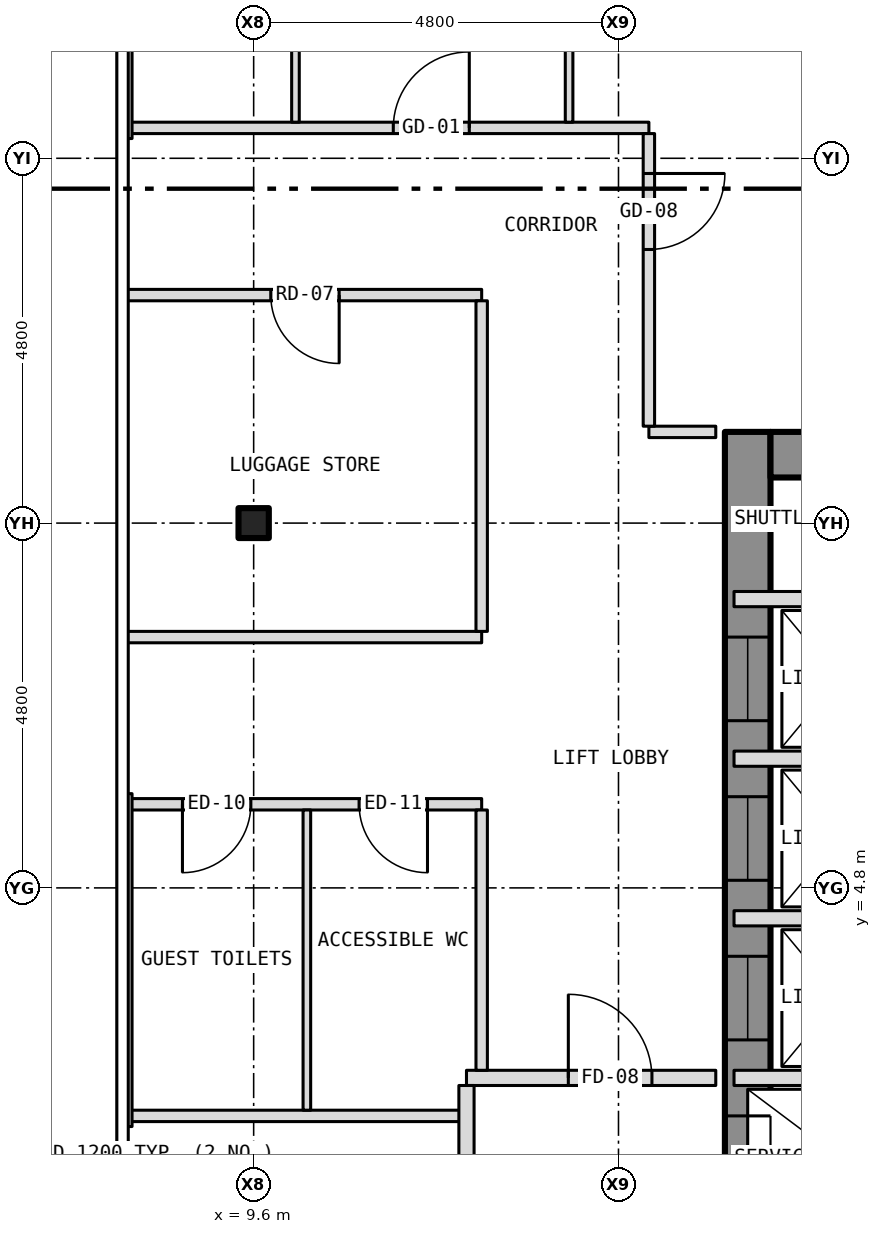
"""IFC4 building model, lengths in metres.
Left out: names, types, materials, properties, quantities, classifications, styles, units other than length and angle.
Written with IfcOpenShell. Run it as: python <this file> out.ifc"""

import sys

from ifc_helpers import new_model, si_unit, direction, frame, frame_2d, origin, origin_2d, place, context, subcontext, project, spatial, rectangle, i_section, extrude, element, fill, save


model = new_model("IFC4")
c1 = context("Model", 3, precision=1e-05, world=origin(), true_north=direction((0.0, 1.0)))
c2 = subcontext(c1, "Body", "Model", "MODEL_VIEW")
j1 = project(units=[si_unit("LENGTHUNIT", "METRE"), si_unit("PLANEANGLEUNIT", "RADIAN")], contexts=[c1])
p1 = place(None, origin())
s1 = spatial("IfcSite", under=j1, at=p1, CompositionType="ELEMENT")
p2 = place(p1, origin())
s2 = spatial("IfcBuilding", under=s1, at=p2, CompositionType="ELEMENT")
p3 = place(p2, frame((0.0, 0.0, 127.5)))
s3 = spatial("IfcBuildingStorey", under=s2, at=p3, CompositionType="ELEMENT", Elevation=127.5)
p4 = place(p3, frame((9.6, 9.6, -0.15), z_axis=(0.0, 0.0, 1.0), x_axis=(1.0, 0.0, 0.0)))
e1 = element("IfcColumn", 1, at=p4, inside=s3, PredefinedType="COLUMN", context=c2, shape_type="SweptSolid", body=[
    extrude(i_section(OverallWidth=0.399, OverallDepth=0.394, WebThickness=0.023, FlangeThickness=0.037, at=origin_2d()), origin(), (0.0, 0.0, 1.0), 3.5),
])
p5 = place(p3, frame((16.1, -10.8, 0.0), z_axis=(0.0, 0.0, 1.0), x_axis=(0.0, 1.0, 0.0)))
e2 = element("IfcWall", 2, at=p5, inside=s3, PredefinedType="SHEAR", context=c2, shape_type="SweptSolid", body=[
    extrude(rectangle(XDim=21.6, YDim=0.6, at=frame_2d((10.8, 0.0))), origin(), (0.0, 0.0, 1.0), 3.25),
])
p6 = place(p5, frame((9.4, 0.0, 0.0)))
e3 = element("IfcOpeningElement", 3, at=p6, cuts=e2, PredefinedType="OPENING", context=c2, shape_type="SweptSolid", body=[
    extrude(rectangle(XDim=1.1, YDim=2.1, at=frame_2d((0.55, 1.05))), frame((0.0, 0.312, 0.0), z_axis=(0.0, -1.0, 0.0), x_axis=(1.0, 0.0, 0.0)), (0.0, 0.0, 1.0), 0.624),
])
p7 = place(p5, frame((11.5, 0.0, 0.0)))
e4 = element("IfcOpeningElement", 4, at=p7, cuts=e2, PredefinedType="OPENING", context=c2, shape_type="SweptSolid", body=[
    extrude(rectangle(XDim=1.1, YDim=2.1, at=frame_2d((0.55, 1.05))), frame((0.0, 0.312, 0.0), z_axis=(0.0, -1.0, 0.0), x_axis=(1.0, 0.0, 0.0)), (0.0, 0.0, 1.0), 0.624),
])
p8 = place(p5, frame((13.6, 0.0, 0.0)))
e5 = element("IfcOpeningElement", 5, at=p8, cuts=e2, PredefinedType="OPENING", context=c2, shape_type="SweptSolid", body=[
    extrude(rectangle(XDim=1.1, YDim=2.1, at=frame_2d((0.55, 1.05))), frame((0.0, 0.312, 0.0), z_axis=(0.0, -1.0, 0.0), x_axis=(1.0, 0.0, 0.0)), (0.0, 0.0, 1.0), 0.624),
])
p9 = place(p5, frame((15.7, 0.0, 0.0)))
e6 = element("IfcOpeningElement", 6, at=p9, cuts=e2, PredefinedType="OPENING", context=c2, shape_type="SweptSolid", body=[
    extrude(rectangle(XDim=1.1, YDim=2.1, at=frame_2d((0.55, 1.05))), frame((0.0, 0.312, 0.0), z_axis=(0.0, -1.0, 0.0), x_axis=(1.0, 0.0, 0.0)), (0.0, 0.0, 1.0), 0.624),
])
p10 = place(p5, frame((17.8, 0.0, 0.0)))
e7 = element("IfcOpeningElement", 7, at=p10, cuts=e2, PredefinedType="OPENING", context=c2, shape_type="SweptSolid", body=[
    extrude(rectangle(XDim=1.1, YDim=2.1, at=frame_2d((0.55, 1.05))), frame((0.0, 0.312, 0.0), z_axis=(0.0, -1.0, 0.0), x_axis=(1.0, 0.0, 0.0)), (0.0, 0.0, 1.0), 0.624),
])
p11 = place(p5, frame((5.642, 0.0, 0.0)))
e8 = element("IfcOpeningElement", 8, at=p11, cuts=e2, PredefinedType="OPENING", context=c2, shape_type="SweptSolid", body=[
    extrude(rectangle(XDim=1.1, YDim=2.1, at=frame_2d((0.55, 1.05))), frame((0.0, 0.312, 0.0), z_axis=(0.0, -1.0, 0.0), x_axis=(1.0, 0.0, 0.0)), (0.0, 0.0, 1.0), 0.624),
])
p12 = place(p5, frame((7.5, 0.0, 0.0)))
e9 = element("IfcOpeningElement", 9, at=p12, cuts=e2, PredefinedType="OPENING", context=c2, shape_type="SweptSolid", body=[
    extrude(rectangle(XDim=1.1, YDim=2.1, at=frame_2d((0.55, 1.05))), frame((0.0, 0.312, 0.0), z_axis=(0.0, -1.0, 0.0), x_axis=(1.0, 0.0, 0.0)), (0.0, 0.0, 1.0), 0.624),
])
p13 = place(p3, frame((16.4, 10.5, 0.0), z_axis=(0.0, 0.0, 1.0), x_axis=(1.0, 0.0, 0.0)))
e10 = element("IfcWall", 10, at=p13, inside=s3, PredefinedType="SHEAR", context=c2, shape_type="SweptSolid", body=[
    extrude(rectangle(XDim=5.8, YDim=0.6, at=frame_2d((2.9, 0.0))), origin(), (0.0, 0.0, 1.0), 3.25),
])
p14 = place(p3, frame((7.875, -1.4, 0.0), z_axis=(0.0, 0.0, 1.0), x_axis=(0.0, 1.0, 0.0)))
e11 = element("IfcWall", 11, at=p14, inside=s3, PredefinedType="SOLIDWALL", context=c2, shape_type="SweptSolid", body=[
    extrude(rectangle(XDim=2.8, YDim=0.2, at=frame_2d((1.4, 0.0))), origin(), (0.0, 0.0, 1.0), 3.5),
])
p15 = place(p14, frame((0.5, 0.0, 0.0)))
e12 = element("IfcOpeningElement", 12, at=p15, cuts=e11, PredefinedType="OPENING", context=c2, shape_type="SweptSolid", body=[
    extrude(rectangle(XDim=1.8, YDim=2.1, at=frame_2d((0.9, 1.05))), frame((0.0, 0.112, 0.0), z_axis=(0.0, -1.0, 0.0), x_axis=(1.0, 0.0, 0.0)), (0.0, 0.0, 1.0), 0.224),
])
p16 = place(p3, frame((7.95, 1.8, 0.0), z_axis=(0.0, 0.0, 1.0), x_axis=(1.0, 0.0, 0.0)))
e13 = element("IfcWall", 13, at=p16, inside=s3, PredefinedType="PARTITIONING", context=c2, shape_type="SweptSolid", body=[
    extrude(rectangle(XDim=4.45, YDim=0.15, at=frame_2d((2.225, 0.0))), origin(), (0.0, 0.0, 1.0), 3.35),
])
p17 = place(p3, frame((12.4, 2.3, 0.0), z_axis=(0.0, 0.0, 1.0), x_axis=(1.0, 0.0, 0.0)))
e14 = element("IfcWall", 14, at=p17, inside=s3, PredefinedType="PARTITIONING", context=c2, shape_type="SweptSolid", body=[
    extrude(rectangle(XDim=3.28, YDim=0.2, at=frame_2d((1.64, 0.0))), origin(), (0.0, 0.0, 1.0), 3.35),
])
p18 = place(p17, frame((1.34, 0.0, 0.0)))
e15 = element("IfcOpeningElement", 15, at=p18, cuts=e14, PredefinedType="OPENING", context=c2, shape_type="SweptSolid", body=[
    extrude(rectangle(XDim=1.1, YDim=2.1, at=frame_2d((0.55, 1.05))), frame((0.0, 0.112, 0.0), z_axis=(0.0, -1.0, 0.0), x_axis=(1.0, 0.0, 0.0)), (0.0, 0.0, 1.0), 0.224),
])
for number, where, z_axis, x_axis in (
    (16, (15.92, 2.3, 0.0), (0.0, 0.0, 1.0), (1.0, 0.0, 0.0)),
    (17, (15.92, 4.4, 0.0), (0.0, 0.0, 1.0), (1.0, 0.0, 0.0)),
):
    element("IfcWall", number, at=place(p3, frame(where, z_axis=z_axis, x_axis=x_axis)), inside=s3, PredefinedType="PARTITIONING", context=c2, shape_type="SweptSolid", body=[
        extrude(rectangle(XDim=2.88, YDim=0.2, at=frame_2d((1.44, 0.0))), origin(), (0.0, 0.0, 1.0), 3.25),
    ])
p19 = place(p3, frame((7.95, 5.9, 0.0), z_axis=(0.0, 0.0, 1.0), x_axis=(1.0, 0.0, 0.0)))
e18 = element("IfcWall", 18, at=p19, inside=s3, PredefinedType="PARTITIONING", context=c2, shape_type="SweptSolid", body=[
    extrude(rectangle(XDim=4.65, YDim=0.15, at=frame_2d((2.325, 0.0))), origin(), (0.0, 0.0, 1.0), 3.35),
])
p20 = place(p19, frame((0.713, 0.0, 0.0)))
e19 = element("IfcOpeningElement", 19, at=p20, cuts=e18, PredefinedType="OPENING", context=c2, shape_type="SweptSolid", body=[
    extrude(rectangle(XDim=0.9, YDim=2.1, at=frame_2d((0.45, 1.05))), frame((0.0, 0.087, 0.0), z_axis=(0.0, -1.0, 0.0), x_axis=(1.0, 0.0, 0.0)), (0.0, 0.0, 1.0), 0.174),
])
p21 = place(p19, frame((3.037, 0.0, 0.0)))
e20 = element("IfcOpeningElement", 20, at=p21, cuts=e18, PredefinedType="OPENING", context=c2, shape_type="SweptSolid", body=[
    extrude(rectangle(XDim=0.9, YDim=2.1, at=frame_2d((0.45, 1.05))), frame((0.0, 0.087, 0.0), z_axis=(0.0, -1.0, 0.0), x_axis=(1.0, 0.0, 0.0)), (0.0, 0.0, 1.0), 0.174),
])
p22 = place(p3, frame((15.92, 6.5, 0.0), z_axis=(0.0, 0.0, 1.0), x_axis=(1.0, 0.0, 0.0)))
e21 = element("IfcWall", 21, at=p22, inside=s3, PredefinedType="PARTITIONING", context=c2, shape_type="SweptSolid", body=[
    extrude(rectangle(XDim=2.88, YDim=0.2, at=frame_2d((1.44, 0.0))), origin(), (0.0, 0.0, 1.0), 3.25),
])
p23 = place(p3, frame((7.92, 8.1, 0.0), z_axis=(0.0, 0.0, 1.0), x_axis=(1.0, 0.0, 0.0)))
e22 = element("IfcWall", 22, at=p23, inside=s3, PredefinedType="PARTITIONING", context=c2, shape_type="SweptSolid", body=[
    extrude(rectangle(XDim=4.68, YDim=0.15, at=frame_2d((2.34, 0.0))), origin(), (0.0, 0.0, 1.0), 3.35),
])
p24 = place(p3, frame((15.92, 8.6, 0.0), z_axis=(0.0, 0.0, 1.0), x_axis=(1.0, 0.0, 0.0)))
e23 = element("IfcWall", 23, at=p24, inside=s3, PredefinedType="PARTITIONING", context=c2, shape_type="SweptSolid", body=[
    extrude(rectangle(XDim=2.88, YDim=0.2, at=frame_2d((1.44, 0.0))), origin(), (0.0, 0.0, 1.0), 3.25),
])
p25 = place(p3, frame((14.8, 10.8, 0.0), z_axis=(0.0, 0.0, 1.0), x_axis=(1.0, 0.0, 0.0)))
e24 = element("IfcWall", 24, at=p25, inside=s3, PredefinedType="PARTITIONING", context=c2, shape_type="SweptSolid", body=[
    extrude(rectangle(XDim=0.88, YDim=0.15, at=frame_2d((0.44, 0.0))), origin(), (0.0, 0.0, 1.0), 3.35),
])
p26 = place(p3, frame((7.92, 12.6, 0.0), z_axis=(0.0, 0.0, 1.0), x_axis=(1.0, 0.0, 0.0)))
e25 = element("IfcWall", 25, at=p26, inside=s3, PredefinedType="PARTITIONING", context=c2, shape_type="SweptSolid", body=[
    extrude(rectangle(XDim=4.68, YDim=0.15, at=frame_2d((2.34, 0.0))), origin(), (0.0, 0.0, 1.0), 3.35),
])
p27 = place(p26, frame((1.905, 0.0, 0.0)))
e26 = element("IfcOpeningElement", 26, at=p27, cuts=e25, PredefinedType="OPENING", context=c2, shape_type="SweptSolid", body=[
    extrude(rectangle(XDim=0.9, YDim=2.1, at=frame_2d((0.45, 1.05))), frame((0.0, 0.087, 0.0), z_axis=(0.0, -1.0, 0.0), x_axis=(1.0, 0.0, 0.0)), (0.0, 0.0, 1.0), 0.174),
])
p28 = place(p3, frame((7.95, 14.8, 0.0), z_axis=(0.0, 0.0, 1.0), x_axis=(1.0, 0.0, 0.0)))
e27 = element("IfcWall", 27, at=p28, inside=s3, PredefinedType="PARTITIONING", context=c2, shape_type="SweptSolid", body=[
    extrude(rectangle(XDim=6.85, YDim=0.15, at=frame_2d((3.425, 0.0))), origin(), (0.0, 0.0, 1.0), 3.35),
])
p29 = place(p28, frame((3.487, 0.0, 0.0)))
e28 = element("IfcOpeningElement", 28, at=p29, cuts=e27, PredefinedType="OPENING", context=c2, shape_type="SweptSolid", body=[
    extrude(rectangle(XDim=1.0, YDim=2.1, at=frame_2d((0.5, 1.05))), frame((0.0, 0.087, 0.0), z_axis=(0.0, -1.0, 0.0), x_axis=(1.0, 0.0, 0.0)), (0.0, 0.0, 1.0), 0.174),
])
p30 = place(p3, frame((7.95, 1.66, 0.0), z_axis=(0.0, 0.0, 1.0), x_axis=(0.0, 1.0, 0.0)))
e29 = element("IfcWall", 29, at=p30, inside=s3, PredefinedType="PARTITIONING", context=c2, shape_type="SweptSolid", body=[
    extrude(rectangle(XDim=4.38, YDim=0.1, at=frame_2d((2.19, 0.0))), origin(), (0.0, 0.0, 1.0), 2.733),
])
p31 = place(p3, frame((7.95, 14.66, 0.0), z_axis=(0.0, 0.0, 1.0), x_axis=(0.0, 1.0, 0.0)))
e30 = element("IfcWall", 30, at=p31, inside=s3, PredefinedType="PARTITIONING", context=c2, shape_type="SweptSolid", body=[
    extrude(rectangle(XDim=3.48, YDim=0.1, at=frame_2d((1.74, 0.0))), origin(), (0.0, 0.0, 1.0), 2.733),
])
p32 = place(p3, frame((10.15, 14.875, 0.0), z_axis=(0.0, 0.0, 1.0), x_axis=(0.0, 1.0, 0.0)))
e31 = element("IfcWall", 31, at=p32, inside=s3, PredefinedType="PARTITIONING", context=c2, shape_type="SweptSolid", body=[
    extrude(rectangle(XDim=3.075, YDim=0.1, at=frame_2d((1.538, 0.0))), origin(), (0.0, 0.0, 1.0), 3.35),
])
p33 = place(p32, frame((1.971, 0.0, 0.0)))
e32 = element("IfcOpeningElement", 32, at=p33, cuts=e31, PredefinedType="OPENING", context=c2, shape_type="SweptSolid", body=[
    extrude(rectangle(XDim=0.9, YDim=2.1, at=frame_2d((0.45, 1.05))), frame((0.0, 0.062, 0.0), z_axis=(0.0, -1.0, 0.0), x_axis=(1.0, 0.0, 0.0)), (0.0, 0.0, 1.0), 0.124),
])
p34 = place(p3, frame((10.3, 1.875, 0.0), z_axis=(0.0, 0.0, 1.0), x_axis=(0.0, 1.0, 0.0)))
e33 = element("IfcWall", 33, at=p34, inside=s3, PredefinedType="PARTITIONING", context=c2, shape_type="SweptSolid", body=[
    extrude(rectangle(XDim=3.95, YDim=0.1, at=frame_2d((1.975, 0.0))), origin(), (0.0, 0.0, 1.0), 3.35),
])
p35 = place(p3, frame((12.4, -1.8, 0.0), z_axis=(0.0, 0.0, 1.0), x_axis=(0.0, 1.0, 0.0)))
e34 = element("IfcWall", 34, at=p35, inside=s3, PredefinedType="PARTITIONING", context=c2, shape_type="SweptSolid", body=[
    extrude(rectangle(XDim=4.0, YDim=0.2, at=frame_2d((2.0, 0.0))), origin(), (0.0, 0.0, 1.0), 3.35),
])
p36 = place(p35, frame((1.25, 0.0, 0.0)))
e35 = element("IfcOpeningElement", 35, at=p36, cuts=e34, PredefinedType="OPENING", context=c2, shape_type="SweptSolid", body=[
    extrude(rectangle(XDim=1.1, YDim=2.1, at=frame_2d((0.55, 1.05))), frame((0.0, 0.112, 0.0), z_axis=(0.0, -1.0, 0.0), x_axis=(1.0, 0.0, 0.0)), (0.0, 0.0, 1.0), 0.224),
])
p37 = place(p3, frame((12.6, 2.4, 0.0), z_axis=(0.0, 0.0, 1.0), x_axis=(0.0, 1.0, 0.0)))
e36 = element("IfcWall", 36, at=p37, inside=s3, PredefinedType="PARTITIONING", context=c2, shape_type="SweptSolid", body=[
    extrude(rectangle(XDim=3.425, YDim=0.15, at=frame_2d((1.712, 0.0))), origin(), (0.0, 0.0, 1.0), 3.35),
])
p38 = place(p3, frame((12.6, 8.175, 0.0), z_axis=(0.0, 0.0, 1.0), x_axis=(0.0, 1.0, 0.0)))
e37 = element("IfcWall", 37, at=p38, inside=s3, PredefinedType="PARTITIONING", context=c2, shape_type="SweptSolid", body=[
    extrude(rectangle(XDim=4.35, YDim=0.15, at=frame_2d((2.175, 0.0))), origin(), (0.0, 0.0, 1.0), 3.35),
])
p39 = place(p3, frame((13.75, 14.875, 0.0), z_axis=(0.0, 0.0, 1.0), x_axis=(0.0, 1.0, 0.0)))
e38 = element("IfcWall", 38, at=p39, inside=s3, PredefinedType="PARTITIONING", context=c2, shape_type="SweptSolid", body=[
    extrude(rectangle(XDim=7.805, YDim=0.1, at=frame_2d((3.902, 0.0))), origin(), (0.0, 0.0, 1.0), 3.35),
])
p40 = place(p3, frame((14.8, 10.875, 0.0), z_axis=(0.0, 0.0, 1.0), x_axis=(0.0, 1.0, 0.0)))
e39 = element("IfcWall", 39, at=p40, inside=s3, PredefinedType="PARTITIONING", context=c2, shape_type="SweptSolid", body=[
    extrude(rectangle(XDim=3.85, YDim=0.15, at=frame_2d((1.925, 0.0))), origin(), (0.0, 0.0, 1.0), 3.35),
])
p41 = place(p40, frame((2.325, 0.0, 0.0)))
e40 = element("IfcOpeningElement", 40, at=p41, cuts=e39, PredefinedType="OPENING", context=c2, shape_type="SweptSolid", body=[
    extrude(rectangle(XDim=1.0, YDim=2.1, at=frame_2d((0.5, 1.05))), frame((0.0, 0.087, 0.0), z_axis=(0.0, -1.0, 0.0), x_axis=(1.0, 0.0, 0.0)), (0.0, 0.0, 1.0), 0.174),
])
p42 = place(p7, origin())
e41 = element("IfcDoor", 41, at=p42, inside=s3, OperationType="SLIDING_TO_LEFT", PredefinedType="DOOR", context=c2, shape_type="SweptSolid", body=[
    extrude(rectangle(XDim=1.1, YDim=2.1, at=frame_2d((0.55, 1.05))), frame((0.0, 0.025, 0.0), z_axis=(0.0, -1.0, 0.0), x_axis=(1.0, 0.0, 0.0)), (0.0, 0.0, 1.0), 0.05),
])
fill(e4, e41)
p43 = place(p8, origin())
e42 = element("IfcDoor", 42, at=p43, inside=s3, OperationType="SLIDING_TO_LEFT", PredefinedType="DOOR", context=c2, shape_type="SweptSolid", body=[
    extrude(rectangle(XDim=1.1, YDim=2.1, at=frame_2d((0.55, 1.05))), frame((0.0, 0.025, 0.0), z_axis=(0.0, -1.0, 0.0), x_axis=(1.0, 0.0, 0.0)), (0.0, 0.0, 1.0), 0.05),
])
fill(e5, e42)
p44 = place(p9, origin())
e43 = element("IfcDoor", 43, at=p44, inside=s3, OperationType="SLIDING_TO_LEFT", PredefinedType="DOOR", context=c2, shape_type="SweptSolid", body=[
    extrude(rectangle(XDim=1.1, YDim=2.1, at=frame_2d((0.55, 1.05))), frame((0.0, 0.025, 0.0), z_axis=(0.0, -1.0, 0.0), x_axis=(1.0, 0.0, 0.0)), (0.0, 0.0, 1.0), 0.05),
])
fill(e6, e43)
p45 = place(p10, origin())
e44 = element("IfcDoor", 44, at=p45, inside=s3, OperationType="SLIDING_TO_LEFT", PredefinedType="DOOR", context=c2, shape_type="SweptSolid", body=[
    extrude(rectangle(XDim=1.1, YDim=2.1, at=frame_2d((0.55, 1.05))), frame((0.0, 0.025, 0.0), z_axis=(0.0, -1.0, 0.0), x_axis=(1.0, 0.0, 0.0)), (0.0, 0.0, 1.0), 0.05),
])
fill(e7, e44)
p46 = place(p18, origin())
e45 = element("IfcDoor", 45, at=p46, inside=s3, OperationType="SINGLE_SWING_LEFT", PredefinedType="DOOR", context=c2, shape_type="SweptSolid", body=[
    extrude(rectangle(XDim=1.1, YDim=2.1, at=frame_2d((0.55, 1.05))), frame((0.0, 0.025, 0.0), z_axis=(0.0, -1.0, 0.0), x_axis=(1.0, 0.0, 0.0)), (0.0, 0.0, 1.0), 0.05),
])
fill(e15, e45)
p47 = place(p29, origin())
e46 = element("IfcDoor", 46, at=p47, inside=s3, OperationType="SINGLE_SWING_RIGHT", PredefinedType="DOOR", context=c2, shape_type="SweptSolid", body=[
    extrude(rectangle(XDim=1.0, YDim=2.1, at=frame_2d((0.5, 1.05))), frame((0.0, 0.025, 0.0), z_axis=(0.0, -1.0, 0.0), x_axis=(1.0, 0.0, 0.0)), (0.0, 0.0, 1.0), 0.05),
])
fill(e28, e46)
p48 = place(p41, origin())
e47 = element("IfcDoor", 47, at=p48, inside=s3, OperationType="SINGLE_SWING_RIGHT", PredefinedType="DOOR", context=c2, shape_type="SweptSolid", body=[
    extrude(rectangle(XDim=1.0, YDim=2.1, at=frame_2d((0.5, 1.05))), frame((0.0, 0.025, 0.0), z_axis=(0.0, -1.0, 0.0), x_axis=(1.0, 0.0, 0.0)), (0.0, 0.0, 1.0), 0.05),
])
fill(e40, e47)
p49 = place(p20, origin())
e48 = element("IfcDoor", 48, at=p49, inside=s3, OperationType="SINGLE_SWING_LEFT", PredefinedType="DOOR", context=c2, shape_type="SweptSolid", body=[
    extrude(rectangle(XDim=0.9, YDim=2.1, at=frame_2d((0.45, 1.05))), frame((0.0, 0.025, 0.0), z_axis=(0.0, -1.0, 0.0), x_axis=(1.0, 0.0, 0.0)), (0.0, 0.0, 1.0), 0.05),
])
fill(e19, e48)
p50 = place(p21, origin())
e49 = element("IfcDoor", 49, at=p50, inside=s3, OperationType="SINGLE_SWING_RIGHT", PredefinedType="DOOR", context=c2, shape_type="SweptSolid", body=[
    extrude(rectangle(XDim=0.9, YDim=2.1, at=frame_2d((0.45, 1.05))), frame((0.0, 0.025, 0.0), z_axis=(0.0, -1.0, 0.0), x_axis=(1.0, 0.0, 0.0)), (0.0, 0.0, 1.0), 0.05),
])
fill(e20, e49)
p51 = place(p27, origin())
e50 = element("IfcDoor", 50, at=p51, inside=s3, OperationType="SINGLE_SWING_RIGHT", PredefinedType="DOOR", context=c2, shape_type="SweptSolid", body=[
    extrude(rectangle(XDim=0.9, YDim=2.1, at=frame_2d((0.45, 1.05))), frame((0.0, 0.025, 0.0), z_axis=(0.0, -1.0, 0.0), x_axis=(1.0, 0.0, 0.0)), (0.0, 0.0, 1.0), 0.05),
])
fill(e26, e50)
save(model, sys.argv[1])
